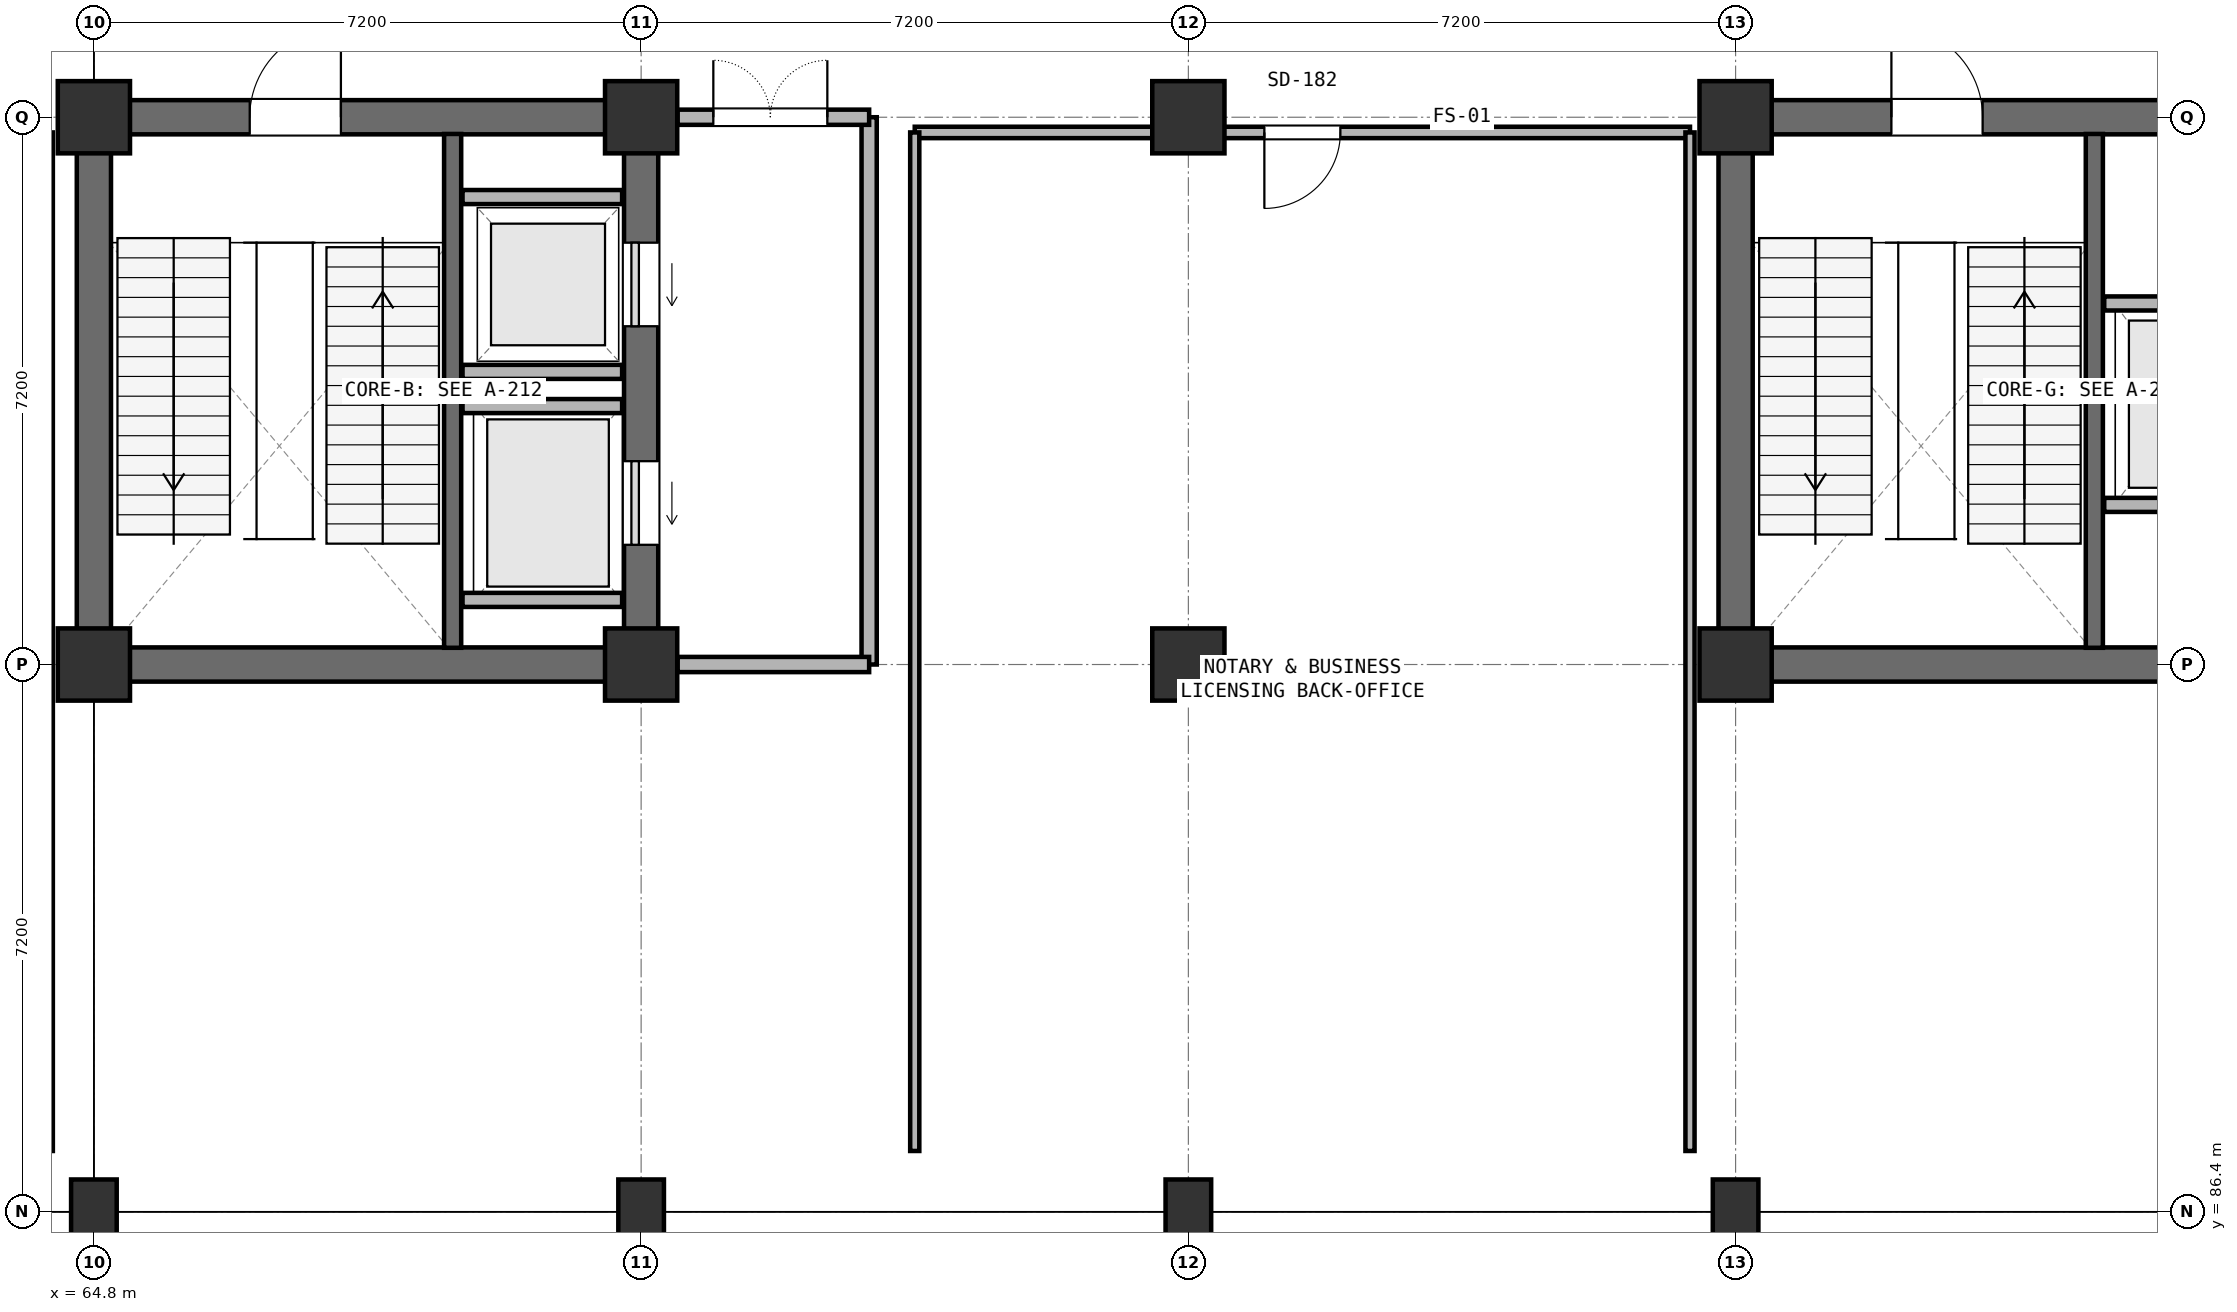
"""IFC4 building model, lengths in metres.
Left out: names, types, materials, properties, quantities, classifications, styles, units other than length and angle.
Written with IfcOpenShell. Run it as: python <this file> out.ifc"""

import sys

from ifc_helpers import new_model, si_unit, direction, frame, frame_2d, origin, origin_2d, place, context, subcontext, project, spatial, rectangle, extrude, element, fill, save


model = new_model("IFC4")
c1 = context("Model", 3, precision=1e-05, world=origin(), true_north=direction((0.0, 1.0)))
c2 = subcontext(c1, "Body", "Model", "MODEL_VIEW")
j1 = project(units=[si_unit("LENGTHUNIT", "METRE"), si_unit("PLANEANGLEUNIT", "RADIAN")], contexts=[c1])
p1 = place(None, origin())
s1 = spatial("IfcSite", under=j1, at=p1, CompositionType="ELEMENT")
p2 = place(p1, origin())
s2 = spatial("IfcBuilding", under=s1, at=p2, CompositionType="ELEMENT")
p3 = place(p2, origin())
s3 = spatial("IfcBuildingStorey", under=s2, at=p3, CompositionType="ELEMENT", Elevation=0.0)
p4 = place(p3, frame((64.8, 86.4, 0.0), z_axis=(0.0, 0.0, 1.0), x_axis=(1.0, 0.0, 0.0)))
e1 = element("IfcColumn", 1, at=p4, inside=s3, PredefinedType="COLUMN", context=c2, shape_type="SweptSolid", body=[
    extrude(rectangle(XDim=0.6, YDim=0.85, at=origin_2d()), origin(), (0.0, 0.0, 1.0), 5.4),
])
for number, where, z_axis, x_axis in (
    (2, (64.8, 93.6, 0.0), (0.0, 0.0, 1.0), (1.0, 0.0, 0.0)),
    (3, (64.8, 100.8, 0.0), (0.0, 0.0, 1.0), (1.0, 0.0, 0.0)),
):
    element("IfcColumn", number, at=place(p3, frame(where, z_axis=z_axis, x_axis=x_axis)), inside=s3, PredefinedType="COLUMN", context=c2, shape_type="SweptSolid", body=[
        extrude(rectangle(XDim=0.95, YDim=0.95, at=origin_2d()), origin(), (0.0, 0.0, 1.0), 5.4),
    ])
p5 = place(p3, frame((72.0, 86.4, 0.0), z_axis=(0.0, 0.0, 1.0), x_axis=(1.0, 0.0, 0.0)))
e4 = element("IfcColumn", 4, at=p5, inside=s3, PredefinedType="COLUMN", context=c2, shape_type="SweptSolid", body=[
    extrude(rectangle(XDim=0.6, YDim=0.85, at=origin_2d()), origin(), (0.0, 0.0, 1.0), 5.4),
])
for number, where, z_axis, x_axis in (
    (5, (72.0, 93.6, 0.0), (0.0, 0.0, 1.0), (1.0, 0.0, 0.0)),
    (6, (72.0, 100.8, 0.0), (0.0, 0.0, 1.0), (1.0, 0.0, 0.0)),
):
    element("IfcColumn", number, at=place(p3, frame(where, z_axis=z_axis, x_axis=x_axis)), inside=s3, PredefinedType="COLUMN", context=c2, shape_type="SweptSolid", body=[
        extrude(rectangle(XDim=0.95, YDim=0.95, at=origin_2d()), origin(), (0.0, 0.0, 1.0), 5.4),
    ])
p6 = place(p3, frame((79.2, 86.4, 0.0), z_axis=(0.0, 0.0, 1.0), x_axis=(1.0, 0.0, 0.0)))
e7 = element("IfcColumn", 7, at=p6, inside=s3, PredefinedType="COLUMN", context=c2, shape_type="SweptSolid", body=[
    extrude(rectangle(XDim=0.6, YDim=0.85, at=origin_2d()), origin(), (0.0, 0.0, 1.0), 5.4),
])
for number, where, z_axis, x_axis in (
    (8, (79.2, 93.6, 0.0), (0.0, 0.0, 1.0), (1.0, 0.0, 0.0)),
    (9, (79.2, 100.8, 0.0), (0.0, 0.0, 1.0), (1.0, 0.0, 0.0)),
):
    element("IfcColumn", number, at=place(p3, frame(where, z_axis=z_axis, x_axis=x_axis)), inside=s3, PredefinedType="COLUMN", context=c2, shape_type="SweptSolid", body=[
        extrude(rectangle(XDim=0.95, YDim=0.95, at=origin_2d()), origin(), (0.0, 0.0, 1.0), 5.4),
    ])
p7 = place(p3, frame((86.4, 86.4, 0.0), z_axis=(0.0, 0.0, 1.0), x_axis=(1.0, 0.0, 0.0)))
e10 = element("IfcColumn", 10, at=p7, inside=s3, PredefinedType="COLUMN", context=c2, shape_type="SweptSolid", body=[
    extrude(rectangle(XDim=0.6, YDim=0.85, at=origin_2d()), origin(), (0.0, 0.0, 1.0), 5.4),
])
for number, where, z_axis, x_axis in (
    (11, (86.4, 93.6, 0.0), (0.0, 0.0, 1.0), (1.0, 0.0, 0.0)),
    (12, (86.4, 100.8, 0.0), (0.0, 0.0, 1.0), (1.0, 0.0, 0.0)),
):
    element("IfcColumn", number, at=place(p3, frame(where, z_axis=z_axis, x_axis=x_axis)), inside=s3, PredefinedType="COLUMN", context=c2, shape_type="SweptSolid", body=[
        extrude(rectangle(XDim=0.95, YDim=0.95, at=origin_2d()), origin(), (0.0, 0.0, 1.0), 5.4),
    ])
p8 = place(p3, frame((65.15, 93.6, 0.0), z_axis=(0.0, 0.0, 1.0), x_axis=(1.0, 0.0, 0.0)))
e13 = element("IfcWall", 13, at=p8, inside=s3, PredefinedType="SHEAR", context=c2, shape_type="SweptSolid", body=[
    extrude(rectangle(XDim=6.5, YDim=0.45, at=frame_2d((3.25, 0.0))), origin(), (0.0, 0.0, 1.0), 5.4),
])
p9 = place(p3, frame((72.0, 93.95, 0.0), z_axis=(0.0, 0.0, 1.0), x_axis=(0.0, 1.0, 0.0)))
e14 = element("IfcWall", 14, at=p9, inside=s3, PredefinedType="SHEAR", context=c2, shape_type="SweptSolid", body=[
    extrude(rectangle(XDim=6.5, YDim=0.45, at=frame_2d((3.25, 0.0))), origin(), (0.0, 0.0, 1.0), 5.4),
])
p10 = place(p9, frame((1.225, 0.0, 0.0)))
e15 = element("IfcOpeningElement", 15, at=p10, cuts=e14, PredefinedType="OPENING", context=c2, shape_type="SweptSolid", body=[
    extrude(rectangle(XDim=1.1, YDim=2.2, at=frame_2d((0.55, 1.1))), frame((0.0, 0.235, 0.0), z_axis=(0.0, -1.0, 0.0), x_axis=(1.0, 0.0, 0.0)), (0.0, 0.0, 1.0), 0.47),
])
p11 = place(p9, frame((4.1, 0.0, 0.0)))
e16 = element("IfcOpeningElement", 16, at=p11, cuts=e14, PredefinedType="OPENING", context=c2, shape_type="SweptSolid", body=[
    extrude(rectangle(XDim=1.1, YDim=2.2, at=frame_2d((0.55, 1.1))), frame((0.0, 0.235, 0.0), z_axis=(0.0, -1.0, 0.0), x_axis=(1.0, 0.0, 0.0)), (0.0, 0.0, 1.0), 0.47),
])
p12 = place(p3, frame((71.65, 100.8, 0.0), z_axis=(0.0, 0.0, 1.0), x_axis=(-1.0, 0.0, 0.0)))
e17 = element("IfcWall", 17, at=p12, inside=s3, PredefinedType="SHEAR", context=c2, shape_type="SweptSolid", body=[
    extrude(rectangle(XDim=6.5, YDim=0.45, at=frame_2d((3.25, 0.0))), origin(), (0.0, 0.0, 1.0), 5.4),
])
p13 = place(p12, frame((3.6, 0.0, 0.0)))
e18 = element("IfcOpeningElement", 18, at=p13, cuts=e17, PredefinedType="OPENING", context=c2, shape_type="SweptSolid", body=[
    extrude(rectangle(XDim=1.2, YDim=2.2, at=frame_2d((0.6, 1.1))), frame((0.0, 0.235, 0.0), z_axis=(0.0, -1.0, 0.0), x_axis=(1.0, 0.0, 0.0)), (0.0, 0.0, 1.0), 0.47),
])
p14 = place(p3, frame((64.8, 100.45, 0.0), z_axis=(0.0, 0.0, 1.0), x_axis=(0.0, -1.0, 0.0)))
e19 = element("IfcWall", 19, at=p14, inside=s3, PredefinedType="SHEAR", context=c2, shape_type="SweptSolid", body=[
    extrude(rectangle(XDim=6.5, YDim=0.45, at=frame_2d((3.25, 0.0))), origin(), (0.0, 0.0, 1.0), 5.4),
])
p15 = place(p3, frame((69.52, 93.82, 0.0), z_axis=(0.0, 0.0, 1.0), x_axis=(0.0, 1.0, 0.0)))
e20 = element("IfcWall", 20, at=p15, inside=s3, PredefinedType="SHEAR", context=c2, shape_type="SweptSolid", body=[
    extrude(rectangle(XDim=6.76, YDim=0.225, at=frame_2d((3.38, 0.0))), origin(), (0.0, 0.0, 1.0), 5.4),
])
p16 = place(p3, frame((86.75, 93.6, 0.0), z_axis=(0.0, 0.0, 1.0), x_axis=(1.0, 0.0, 0.0)))
e21 = element("IfcWall", 21, at=p16, inside=s3, PredefinedType="SHEAR", context=c2, shape_type="SweptSolid", body=[
    extrude(rectangle(XDim=6.5, YDim=0.45, at=frame_2d((3.25, 0.0))), origin(), (0.0, 0.0, 1.0), 5.4),
])
p17 = place(p3, frame((93.25, 100.8, 0.0), z_axis=(0.0, 0.0, 1.0), x_axis=(-1.0, 0.0, 0.0)))
e22 = element("IfcWall", 22, at=p17, inside=s3, PredefinedType="SHEAR", context=c2, shape_type="SweptSolid", body=[
    extrude(rectangle(XDim=6.5, YDim=0.45, at=frame_2d((3.25, 0.0))), origin(), (0.0, 0.0, 1.0), 5.4),
])
p18 = place(p17, frame((3.6, 0.0, 0.0)))
e23 = element("IfcOpeningElement", 23, at=p18, cuts=e22, PredefinedType="OPENING", context=c2, shape_type="SweptSolid", body=[
    extrude(rectangle(XDim=1.2, YDim=2.2, at=frame_2d((0.6, 1.1))), frame((0.0, 0.235, 0.0), z_axis=(0.0, -1.0, 0.0), x_axis=(1.0, 0.0, 0.0)), (0.0, 0.0, 1.0), 0.47),
])
p19 = place(p3, frame((86.4, 100.45, 0.0), z_axis=(0.0, 0.0, 1.0), x_axis=(0.0, -1.0, 0.0)))
e24 = element("IfcWall", 24, at=p19, inside=s3, PredefinedType="SHEAR", context=c2, shape_type="SweptSolid", body=[
    extrude(rectangle(XDim=6.5, YDim=0.45, at=frame_2d((3.25, 0.0))), origin(), (0.0, 0.0, 1.0), 5.4),
])
p20 = place(p3, frame((91.12, 93.82, 0.0), z_axis=(0.0, 0.0, 1.0), x_axis=(0.0, 1.0, 0.0)))
e25 = element("IfcWall", 25, at=p20, inside=s3, PredefinedType="SHEAR", context=c2, shape_type="SweptSolid", body=[
    extrude(rectangle(XDim=6.76, YDim=0.225, at=frame_2d((3.38, 0.0))), origin(), (0.0, 0.0, 1.0), 5.4),
])
for number, where, z_axis, x_axis in (
    (26, (69.65, 94.45, 0.0), (0.0, 0.0, 1.0), (1.0, 0.0, 0.0)),
    (27, (69.65, 97.0, 0.0), (0.0, 0.0, 1.0), (1.0, 0.0, 0.0)),
    (28, (69.65, 97.45, 0.0), (0.0, 0.0, 1.0), (1.0, 0.0, 0.0)),
    (29, (69.65, 99.75, 0.0), (0.0, 0.0, 1.0), (1.0, 0.0, 0.0)),
    (30, (91.25, 95.7, 0.0), (0.0, 0.0, 1.0), (1.0, 0.0, 0.0)),
    (31, (91.25, 98.35, 0.0), (0.0, 0.0, 1.0), (1.0, 0.0, 0.0)),
):
    element("IfcWall", number, at=place(p3, frame(where, z_axis=z_axis, x_axis=x_axis)), inside=s3, PredefinedType="PARTITIONING", context=c2, shape_type="SweptSolid", body=[
        extrude(rectangle(XDim=2.1, YDim=0.185, at=frame_2d((1.05, 0.0))), origin(), (0.0, 0.0, 1.0), 5.4),
    ])
p21 = place(p3, frame((75.0, 93.6, 0.0), z_axis=(0.0, 0.0, 1.0), x_axis=(0.0, 1.0, 0.0)))
e32 = element("IfcWall", 32, at=p21, inside=s3, PredefinedType="PARTITIONING", context=c2, shape_type="SweptSolid", body=[
    extrude(rectangle(XDim=7.2, YDim=0.2, at=frame_2d((3.6, 0.0))), origin(), (0.0, 0.0, 1.0), 4.12),
])
p22 = place(p3, frame((72.48, 93.6, 0.0), z_axis=(0.0, 0.0, 1.0), x_axis=(1.0, 0.0, 0.0)))
e33 = element("IfcWall", 33, at=p22, inside=s3, PredefinedType="PARTITIONING", context=c2, shape_type="SweptSolid", body=[
    extrude(rectangle(XDim=2.52, YDim=0.2, at=frame_2d((1.26, 0.0))), origin(), (0.0, 0.0, 1.0), 4.12),
])
p23 = place(p3, frame((75.0, 100.8, 0.0), z_axis=(0.0, 0.0, 1.0), x_axis=(-1.0, 0.0, 0.0)))
e34 = element("IfcWall", 34, at=p23, inside=s3, PredefinedType="PARTITIONING", context=c2, shape_type="SweptSolid", body=[
    extrude(rectangle(XDim=2.52, YDim=0.2, at=frame_2d((1.26, 0.0))), origin(), (0.0, 0.0, 1.0), 4.12),
])
p24 = place(p23, frame((0.55, 0.0, 0.0)))
e35 = element("IfcOpeningElement", 35, at=p24, cuts=e34, PredefinedType="OPENING", context=c2, shape_type="SweptSolid", body=[
    extrude(rectangle(XDim=1.5, YDim=2.2, at=frame_2d((0.75, 1.1))), frame((0.0, 0.11, 0.0), z_axis=(0.0, -1.0, 0.0), x_axis=(1.0, 0.0, 0.0)), (0.0, 0.0, 1.0), 0.22),
])
p25 = place(p3, frame((64.2, 100.6, 0.0), z_axis=(0.0, 0.0, 1.0), x_axis=(0.0, -1.0, 0.0)))
e36 = element("IfcWall", 36, at=p25, inside=s3, PredefinedType="PARTITIONING", context=c2, shape_type="SweptSolid", body=[
    extrude(rectangle(XDim=13.4, YDim=0.12, at=frame_2d((6.7, 0.0))), origin(), (0.0, 0.0, 1.0), 4.12),
])
p26 = place(p3, frame((85.8, 100.6, 0.0), z_axis=(0.0, 0.0, 1.0), x_axis=(-1.0, 0.0, 0.0)))
e37 = element("IfcWall", 37, at=p26, inside=s3, PredefinedType="PARTITIONING", context=c2, shape_type="SweptSolid", body=[
    extrude(rectangle(XDim=10.2, YDim=0.15, at=frame_2d((5.1, 0.0))), origin(), (0.0, 0.0, 1.0), 4.12),
])
p27 = place(p26, frame((4.6, 0.0, 0.0)))
e38 = element("IfcOpeningElement", 38, at=p27, cuts=e37, PredefinedType="OPENING", context=c2, shape_type="SweptSolid", body=[
    extrude(rectangle(XDim=1.0, YDim=2.15, at=frame_2d((0.5, 1.075))), frame((0.0, 0.085, 0.0), z_axis=(0.0, -1.0, 0.0), x_axis=(1.0, 0.0, 0.0)), (0.0, 0.0, 1.0), 0.17),
])
for number, where, z_axis, x_axis in (
    (39, (75.6, 87.2, 0.0), (0.0, 0.0, 1.0), (0.0, 1.0, 0.0)),
    (40, (85.8, 100.6, 0.0), (0.0, 0.0, 1.0), (0.0, -1.0, 0.0)),
):
    element("IfcWall", number, at=place(p3, frame(where, z_axis=z_axis, x_axis=x_axis)), inside=s3, PredefinedType="PARTITIONING", context=c2, shape_type="SweptSolid", body=[
        extrude(rectangle(XDim=13.4, YDim=0.12, at=frame_2d((6.7, 0.0))), origin(), (0.0, 0.0, 1.0), 4.12),
    ])
p28 = place(p10, origin())
e41 = element("IfcDoor", 41, at=p28, inside=s3, OperationType="SLIDING_TO_LEFT", PredefinedType="DOOR", context=c2, shape_type="SweptSolid", body=[
    extrude(rectangle(XDim=1.1, YDim=2.2, at=frame_2d((0.55, 1.1))), frame((0.0, 0.025, 0.0), z_axis=(0.0, -1.0, 0.0), x_axis=(1.0, 0.0, 0.0)), (0.0, 0.0, 1.0), 0.05),
])
fill(e15, e41)
p29 = place(p11, origin())
e42 = element("IfcDoor", 42, at=p29, inside=s3, OperationType="SLIDING_TO_LEFT", PredefinedType="DOOR", context=c2, shape_type="SweptSolid", body=[
    extrude(rectangle(XDim=1.1, YDim=2.2, at=frame_2d((0.55, 1.1))), frame((0.0, 0.025, 0.0), z_axis=(0.0, -1.0, 0.0), x_axis=(1.0, 0.0, 0.0)), (0.0, 0.0, 1.0), 0.05),
])
fill(e16, e42)
p30 = place(p13, frame((1.2, 0.0, 0.0), z_axis=(0.0, 0.0, 1.0), x_axis=(-1.0, 0.0, 0.0)))
e43 = element("IfcDoor", 43, at=p30, inside=s3, OperationType="SINGLE_SWING_RIGHT", PredefinedType="DOOR", context=c2, shape_type="SweptSolid", body=[
    extrude(rectangle(XDim=1.2, YDim=2.2, at=frame_2d((0.6, 1.1))), frame((0.0, 0.025, 0.0), z_axis=(0.0, -1.0, 0.0), x_axis=(1.0, 0.0, 0.0)), (0.0, 0.0, 1.0), 0.05),
])
fill(e18, e43)
p31 = place(p24, frame((1.5, 0.0, 0.0), z_axis=(0.0, 0.0, 1.0), x_axis=(-1.0, 0.0, 0.0)))
e44 = element("IfcDoor", 44, at=p31, inside=s3, OperationType="DOUBLE_DOOR_SINGLE_SWING", PredefinedType="DOOR", context=c2, shape_type="SweptSolid", body=[
    extrude(rectangle(XDim=1.5, YDim=2.2, at=frame_2d((0.75, 1.1))), frame((0.0, 0.025, 0.0), z_axis=(0.0, -1.0, 0.0), x_axis=(1.0, 0.0, 0.0)), (0.0, 0.0, 1.0), 0.05),
])
fill(e35, e44)
p32 = place(p18, frame((1.2, 0.0, 0.0), z_axis=(0.0, 0.0, 1.0), x_axis=(-1.0, 0.0, 0.0)))
e45 = element("IfcDoor", 45, at=p32, inside=s3, OperationType="SINGLE_SWING_LEFT", PredefinedType="DOOR", context=c2, shape_type="SweptSolid", body=[
    extrude(rectangle(XDim=1.2, YDim=2.2, at=frame_2d((0.6, 1.1))), frame((0.0, 0.025, 0.0), z_axis=(0.0, -1.0, 0.0), x_axis=(1.0, 0.0, 0.0)), (0.0, 0.0, 1.0), 0.05),
])
fill(e23, e45)
p33 = place(p27, origin())
e46 = element("IfcDoor", 46, at=p33, inside=s3, OperationType="SINGLE_SWING_RIGHT", PredefinedType="DOOR", context=c2, shape_type="SweptSolid", body=[
    extrude(rectangle(XDim=1.0, YDim=2.15, at=frame_2d((0.5, 1.075))), frame((0.0, 0.025, 0.0), z_axis=(0.0, -1.0, 0.0), x_axis=(1.0, 0.0, 0.0)), (0.0, 0.0, 1.0), 0.05),
])
fill(e38, e46)
save(model, sys.argv[1])
